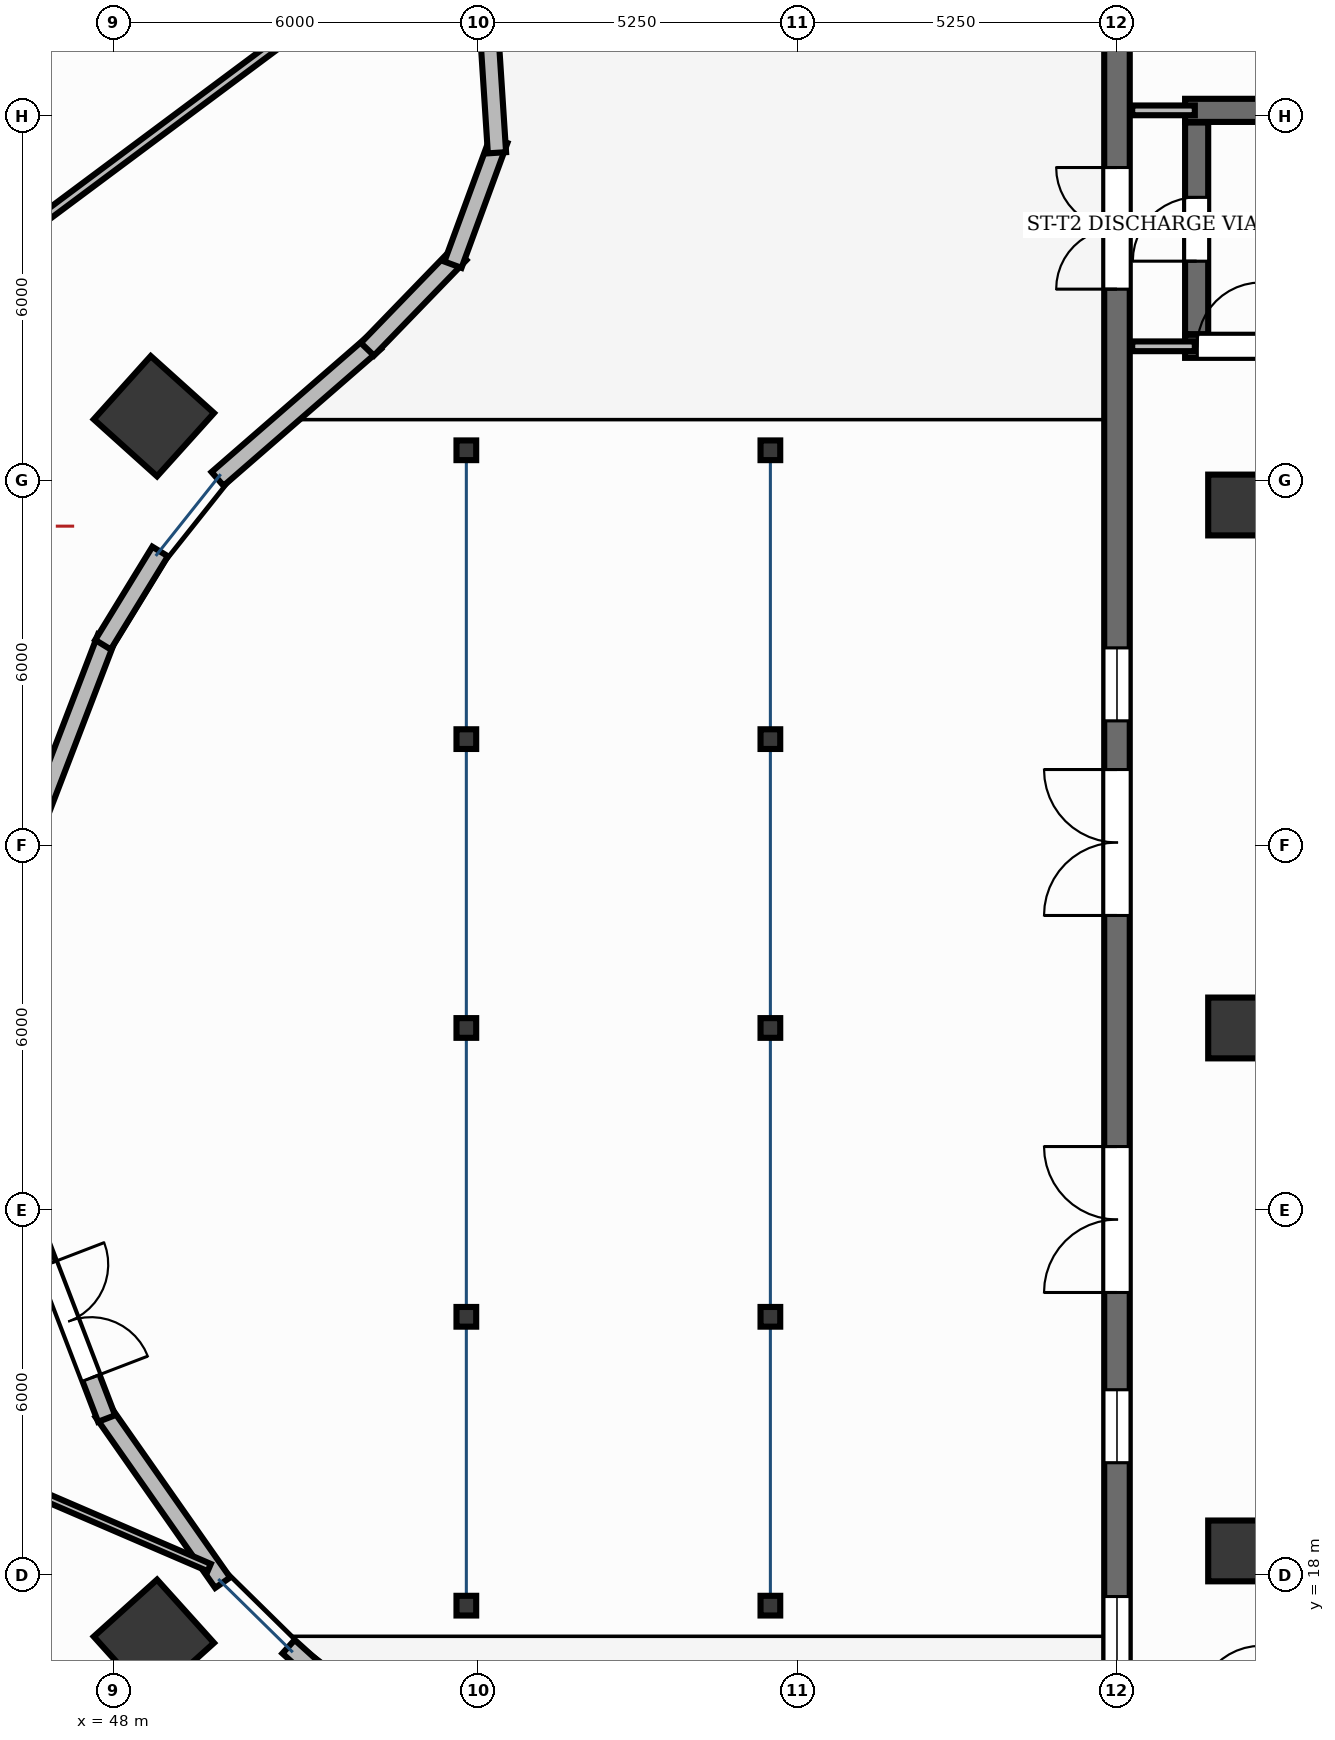
"""IFC4 building model, lengths in metres.
Left out: names, types, materials, properties, quantities, classifications, styles, units other than length and angle.
Written with IfcOpenShell. Run it as: python <this file> out.ifc"""

import sys

from ifc_helpers import new_model, si_unit, direction, frame, frame_2d, origin, origin_2d, place, context, subcontext, project, spatial, rectangle, hollow_circle, extrude, element, fill, save


model = new_model("IFC4")
c1 = context("Model", 3, precision=1e-05, world=origin(), true_north=direction((0.0, 1.0)))
c2 = subcontext(c1, "Body", "Model", "MODEL_VIEW")
j1 = project(units=[si_unit("LENGTHUNIT", "METRE"), si_unit("PLANEANGLEUNIT", "RADIAN")], contexts=[c1])
p1 = place(None, origin())
s1 = spatial("IfcSite", under=j1, at=p1, CompositionType="ELEMENT")
p2 = place(p1, origin())
s2 = spatial("IfcBuilding", under=s1, at=p2, CompositionType="ELEMENT")
p3 = place(p2, origin())
s3 = spatial("IfcBuildingStorey", under=s2, at=p3, CompositionType="ELEMENT", Elevation=0.0)
for number, where, z_axis, x_axis in (
    (1, (48.662, 16.939, -0.0), (0.0, 0.0, 1.0), (-0.669, 0.743, 0.0)),
    (2, (48.662, 37.061, -0.0), (0.0, 0.0, 1.0), (0.669, 0.743, 0.0)),
):
    element("IfcColumn", number, at=place(p3, frame(where, z_axis=z_axis, x_axis=x_axis)), inside=s3, PredefinedType="COLUMN", context=c2, shape_type="SweptSolid", body=[
        extrude(rectangle(XDim=1.4, YDim=1.4, at=origin_2d()), origin(), (0.0, 0.0, 1.0), 5.101),
    ])
for number, where, z_axis, x_axis in (
    (3, (66.5, 18.4, 0.0), (0.0, 0.0, 1.0), (1.0, 0.0, 0.0)),
    (4, (66.5, 27.0, 0.0), (0.0, 0.0, 1.0), (1.0, 0.0, 0.0)),
    (5, (66.5, 35.6, 0.0), (0.0, 0.0, 1.0), (1.0, 0.0, 0.0)),
):
    element("IfcColumn", number, at=place(p3, frame(where, z_axis=z_axis, x_axis=x_axis)), inside=s3, PredefinedType="COLUMN", context=c2, shape_type="SweptSolid", body=[
        extrude(rectangle(XDim=1.0, YDim=1.0, at=origin_2d()), origin(), (0.0, 0.0, 1.0), 5.1),
    ])
p4 = place(p3, frame((64.5, 7.25, 0.0), z_axis=(0.0, 0.0, 1.0), x_axis=(0.0, 1.0, 0.0)))
e6 = element("IfcWall", 6, at=p4, inside=s3, PredefinedType="SHEAR", context=c2, shape_type="SweptSolid", body=[
    extrude(rectangle(XDim=39.5, YDim=0.42, at=frame_2d((19.75, 0.0))), origin(), (0.0, 0.0, 1.0), 5.1),
])
p5 = place(p4, frame((9.2, 0.0, 0.9)))
e7 = element("IfcOpeningElement", 7, at=p5, cuts=e6, PredefinedType="OPENING", context=c2, shape_type="SweptSolid", body=[
    extrude(rectangle(XDim=1.2, YDim=2.7, at=frame_2d((0.6, 1.35))), frame((0.0, 0.225, 0.0), z_axis=(0.0, -1.0, 0.0), x_axis=(1.0, 0.0, 0.0)), (0.0, 0.0, 1.0), 0.45),
])
p6 = place(p4, frame((12.6, 0.0, 0.9)))
e8 = element("IfcOpeningElement", 8, at=p6, cuts=e6, PredefinedType="OPENING", context=c2, shape_type="SweptSolid", body=[
    extrude(rectangle(XDim=1.2, YDim=2.7, at=frame_2d((0.6, 1.35))), frame((0.0, 0.225, 0.0), z_axis=(0.0, -1.0, 0.0), x_axis=(1.0, 0.0, 0.0)), (0.0, 0.0, 1.0), 0.45),
])
p7 = place(p4, frame((24.8, 0.0, 0.9)))
e9 = element("IfcOpeningElement", 9, at=p7, cuts=e6, PredefinedType="OPENING", context=c2, shape_type="SweptSolid", body=[
    extrude(rectangle(XDim=1.2, YDim=2.7, at=frame_2d((0.6, 1.35))), frame((0.0, 0.225, 0.0), z_axis=(0.0, -1.0, 0.0), x_axis=(1.0, 0.0, 0.0)), (0.0, 0.0, 1.0), 0.45),
])
p8 = place(p4, frame((36.2, 0.0, 0.9)))
e10 = element("IfcOpeningElement", 10, at=p8, cuts=e6, PredefinedType="OPENING", context=c2, shape_type="SweptSolid", body=[
    extrude(rectangle(XDim=1.2, YDim=2.7, at=frame_2d((0.6, 1.35))), frame((0.0, 0.225, 0.0), z_axis=(0.0, -1.0, 0.0), x_axis=(1.0, 0.0, 0.0)), (0.0, 0.0, 1.0), 0.45),
])
p9 = place(p4, frame((15.4, 0.0, 0.0)))
e11 = element("IfcOpeningElement", 11, at=p9, cuts=e6, PredefinedType="OPENING", context=c2, shape_type="SweptSolid", body=[
    extrude(rectangle(XDim=2.4, YDim=2.7, at=frame_2d((1.2, 1.35))), frame((0.0, 0.225, 0.0), z_axis=(0.0, -1.0, 0.0), x_axis=(1.0, 0.0, 0.0)), (0.0, 0.0, 1.0), 0.45),
])
p10 = place(p4, frame((21.6, 0.0, 0.0)))
e12 = element("IfcOpeningElement", 12, at=p10, cuts=e6, PredefinedType="OPENING", context=c2, shape_type="SweptSolid", body=[
    extrude(rectangle(XDim=2.4, YDim=2.7, at=frame_2d((1.2, 1.35))), frame((0.0, 0.225, 0.0), z_axis=(0.0, -1.0, 0.0), x_axis=(1.0, 0.0, 0.0)), (0.0, 0.0, 1.0), 0.45),
])
p11 = place(p4, frame((5.6, 0.0, 0.0)))
e13 = element("IfcOpeningElement", 13, at=p11, cuts=e6, PredefinedType="OPENING", context=c2, shape_type="SweptSolid", body=[
    extrude(rectangle(XDim=2.0, YDim=2.3, at=frame_2d((1.0, 1.15))), frame((0.0, 0.225, 0.0), z_axis=(0.0, -1.0, 0.0), x_axis=(1.0, 0.0, 0.0)), (0.0, 0.0, 1.0), 0.45),
])
p12 = place(p4, frame((31.9, 0.0, 0.0)))
e14 = element("IfcOpeningElement", 14, at=p12, cuts=e6, PredefinedType="OPENING", context=c2, shape_type="SweptSolid", body=[
    extrude(rectangle(XDim=2.0, YDim=2.3, at=frame_2d((1.0, 1.15))), frame((0.0, 0.225, 0.0), z_axis=(0.0, -1.0, 0.0), x_axis=(1.0, 0.0, 0.0)), (0.0, 0.0, 1.0), 0.45),
])
p13 = place(p3, frame((65.62, 38.21, 0.0), z_axis=(0.0, 0.0, 1.0), x_axis=(1.0, 0.0, 0.0)))
e15 = element("IfcWall", 15, at=p13, inside=s3, PredefinedType="SHEAR", context=c2, shape_type="SweptSolid", body=[
    extrude(rectangle(XDim=8.61, YDim=0.38, at=frame_2d((4.305, 0.0))), origin(), (0.0, 0.0, 1.0), 5.1),
])
p14 = place(p13, frame((0.2, 0.0, 0.0)))
e16 = element("IfcOpeningElement", 16, at=p14, cuts=e15, PredefinedType="OPENING", context=c2, shape_type="SweptSolid", body=[
    extrude(rectangle(XDim=1.05, YDim=2.15, at=frame_2d((0.525, 1.075))), frame((0.0, 0.205, 0.0), z_axis=(0.0, -1.0, 0.0), x_axis=(1.0, 0.0, 0.0)), (0.0, 0.0, 1.0), 0.41),
])
p15 = place(p3, frame((65.62, 42.09, 0.0), z_axis=(0.0, 0.0, 1.0), x_axis=(1.0, 0.0, 0.0)))
e17 = element("IfcWall", 17, at=p15, inside=s3, PredefinedType="SHEAR", context=c2, shape_type="SweptSolid", body=[
    extrude(rectangle(XDim=8.61, YDim=0.38, at=frame_2d((4.305, 0.0))), origin(), (0.0, 0.0, 1.0), 5.1),
])
p16 = place(p3, frame((65.81, 38.41, 0.0), z_axis=(0.0, 0.0, 1.0), x_axis=(0.0, 1.0, 0.0)))
e18 = element("IfcWall", 18, at=p16, inside=s3, PredefinedType="SHEAR", context=c2, shape_type="SweptSolid", body=[
    extrude(rectangle(XDim=3.48, YDim=0.38, at=frame_2d((1.74, 0.0))), origin(), (0.0, 0.0, 1.0), 5.1),
])
p17 = place(p16, frame((1.2, 0.0, 0.0)))
e19 = element("IfcOpeningElement", 19, at=p17, cuts=e18, PredefinedType="OPENING", context=c2, shape_type="SweptSolid", body=[
    extrude(rectangle(XDim=1.05, YDim=2.15, at=frame_2d((0.525, 1.075))), frame((0.0, 0.205, 0.0), z_axis=(0.0, -1.0, 0.0), x_axis=(1.0, 0.0, 0.0)), (0.0, 0.0, 1.0), 0.41),
])
for number, where, z_axis, x_axis in (
    (20, (58.8, 17.5, -0.0), (0.0, 0.0, 1.0), (1.0, 0.0, 0.0)),
    (21, (53.8, 17.5, -0.0), (0.0, 0.0, 1.0), (1.0, 0.0, 0.0)),
    (22, (58.8, 22.25, -0.0), (0.0, 0.0, 1.0), (1.0, 0.0, 0.0)),
    (23, (53.8, 22.25, -0.0), (0.0, 0.0, 1.0), (1.0, 0.0, 0.0)),
    (24, (58.8, 27.0, -0.0), (0.0, 0.0, 1.0), (1.0, 0.0, 0.0)),
    (25, (53.8, 27.0, -0.0), (0.0, 0.0, 1.0), (1.0, 0.0, 0.0)),
    (26, (58.8, 31.75, -0.0), (0.0, 0.0, 1.0), (1.0, 0.0, 0.0)),
    (27, (53.8, 31.75, -0.0), (0.0, 0.0, 1.0), (1.0, 0.0, 0.0)),
    (28, (58.8, 36.5, -0.0), (0.0, 0.0, 1.0), (1.0, 0.0, 0.0)),
    (29, (53.8, 36.5, -0.0), (0.0, 0.0, 1.0), (1.0, 0.0, 0.0)),
):
    element("IfcColumn", number, at=place(p3, frame(where, z_axis=z_axis, x_axis=x_axis)), inside=s3, PredefinedType="COLUMN", context=c2, shape_type="SweptSolid", body=[
        extrude(hollow_circle(Radius=0.162, WallThickness=0.016, at=origin_2d()), origin(), (0.0, 0.0, 1.0), 5.081),
    ])
p18 = place(p3, frame((53.704, 14.264, 0.0), z_axis=(0.0, 0.0, 1.0), x_axis=(-0.74117794387, 0.671308614216, 0.0)))
e30 = element("IfcWall", 30, at=p18, inside=s3, PredefinedType="STANDARD", context=c2, shape_type="SweptSolid", body=[
    extrude(rectangle(XDim=3.816, YDim=0.3, at=frame_2d((1.908, 0.0))), origin(), (0.0, 0.0, 1.0), 5.1),
])
p19 = place(p3, frame((49.792, 17.878, 0.0), z_axis=(0.0, 0.0, 1.0), x_axis=(-0.573576992806, 0.819151654655, 0.0)))
e31 = element("IfcWall", 31, at=p19, inside=s3, PredefinedType="STANDARD", context=c2, shape_type="SweptSolid", body=[
    extrude(rectangle(XDim=3.43, YDim=0.3, at=frame_2d((1.715, 0.0))), origin(), (0.0, 0.0, 1.0), 5.1),
])
p20 = place(p3, frame((46.655, 23.779, 0.0), z_axis=(0.0, 0.0, 1.0), x_axis=(0.358344570513, -0.933589400531, 0.0)))
e32 = element("IfcWall", 32, at=p20, inside=s3, PredefinedType="STANDARD", context=c2, shape_type="SweptSolid", body=[
    extrude(rectangle(XDim=3.43, YDim=0.3, at=frame_2d((1.715, 0.0))), origin(), (0.0, 0.0, 1.0), 5.1),
])
p21 = place(p20, frame((0.715, 0.0, 0.0)))
e33 = element("IfcOpeningElement", 33, at=p21, cuts=e32, PredefinedType="OPENING", context=c2, shape_type="SweptSolid", body=[
    extrude(rectangle(XDim=2.0, YDim=2.3, at=frame_2d((1.0, 1.15))), frame((0.0, 0.165, 0.0), z_axis=(0.0, -1.0, 0.0), x_axis=(1.0, 0.0, 0.0)), (0.0, 0.0, 1.0), 0.33),
])
p22 = place(p3, frame((46.655, 30.221, 0.0), z_axis=(0.0, 0.0, 1.0), x_axis=(0.358344570513, 0.933589400531, 0.0)))
e34 = element("IfcWall", 34, at=p22, inside=s3, PredefinedType="STANDARD", context=c2, shape_type="SweptSolid", body=[
    extrude(rectangle(XDim=3.43, YDim=0.3, at=frame_2d((1.715, 0.0))), origin(), (0.0, 0.0, 1.0), 5.1),
])
p23 = place(p3, frame((47.825, 33.303, 0.0), z_axis=(0.0, 0.0, 1.0), x_axis=(0.522520662875, 0.852626622191, 0.0)))
e35 = element("IfcWall", 35, at=p23, inside=s3, PredefinedType="STANDARD", context=c2, shape_type="SweptSolid", body=[
    extrude(rectangle(XDim=1.798, YDim=0.3, at=frame_2d((0.899, 0.0))), origin(), (0.0, 0.0, 1.0), 5.1),
])
p24 = place(p3, frame((49.709, 36.029, 0.0), z_axis=(0.0, 0.0, 1.0), x_axis=(0.754746490246, 0.656016566454, 0.0)))
e36 = element("IfcWall", 36, at=p24, inside=s3, PredefinedType="STANDARD", context=c2, shape_type="SweptSolid", body=[
    extrude(rectangle(XDim=3.43, YDim=0.3, at=frame_2d((1.715, 0.0))), origin(), (0.0, 0.0, 1.0), 5.1),
])
p25 = place(p3, frame((52.173, 38.161, 0.0), z_axis=(0.0, 0.0, 1.0), x_axis=(0.695404695719, 0.718618333451, 0.0)))
e37 = element("IfcWall", 37, at=p25, inside=s3, PredefinedType="STANDARD", context=c2, shape_type="SweptSolid", body=[
    extrude(rectangle(XDim=2.188, YDim=0.3, at=frame_2d((1.094, 0.0))), origin(), (0.0, 0.0, 1.0), 5.1),
])
for number, where, z_axis, x_axis in (
    (38, (53.58, 39.552, 0.0), (0.0, 0.0, 1.0), (0.345, 0.939, 0.0)),
    (39, (54.304, 41.393, 0.0), (0.0, 0.0, 1.0), (-0.065, 0.998, 0.0)),
):
    element("IfcWall", number, at=place(p3, frame(where, z_axis=z_axis, x_axis=x_axis)), inside=s3, PredefinedType="STANDARD", context=c2, shape_type="SweptSolid", body=[
        extrude(rectangle(XDim=2.188, YDim=0.3, at=frame_2d((1.094, 0.0))), origin(), (0.0, 0.0, 1.0), 5.1),
    ])
for number, where, z_axis, x_axis in (
    (40, (64.75, 38.21, 0.0), (0.0, 0.0, 1.0), (1.0, 0.0, 0.0)),
    (41, (64.75, 42.09, 0.0), (0.0, 0.0, 1.0), (1.0, 0.0, 0.0)),
):
    element("IfcWall", number, at=place(p3, frame(where, z_axis=z_axis, x_axis=x_axis)), inside=s3, PredefinedType="PARTITIONING", context=c2, shape_type="SweptSolid", body=[
        extrude(rectangle(XDim=1.03, YDim=0.16, at=frame_2d((0.515, 0.0))), origin(), (0.0, 0.0, 1.0), 4.11),
    ])
p26 = place(p3, frame((45.71, 19.79, 0.0), z_axis=(0.0, 0.0, 1.0), x_axis=(0.918452858102, -0.395530463358, 0.0)))
e42 = element("IfcWall", 42, at=p26, inside=s3, PredefinedType="PARTITIONING", context=c2, shape_type="SweptSolid", body=[
    extrude(rectangle(XDim=4.205, YDim=0.13, at=frame_2d((2.102, 0.0))), origin(), (0.0, 0.0, 1.0), 4.11),
])
p27 = place(p3, frame((43.21, 37.609, 0.0), z_axis=(0.0, 0.0, 1.0), x_axis=(0.801772318533, 0.597629608733, 0.0)))
e43 = element("IfcWall", 43, at=p27, inside=s3, PredefinedType="PARTITIONING", context=c2, shape_type="SweptSolid", body=[
    extrude(rectangle(XDim=12.703, YDim=0.15, at=frame_2d((6.352, 0.0))), origin(), (0.0, 0.0, 1.0), 4.11),
])
p28 = place(p21, origin())
e44 = element("IfcDoor", 44, at=p28, inside=s3, OperationType="DOUBLE_DOOR_SINGLE_SWING", PredefinedType="DOOR", context=c2, shape_type="SweptSolid", body=[
    extrude(rectangle(XDim=2.0, YDim=2.3, at=frame_2d((1.0, 1.15))), frame((0.0, 0.025, 0.0), z_axis=(0.0, -1.0, 0.0), x_axis=(1.0, 0.0, 0.0)), (0.0, 0.0, 1.0), 0.05),
])
fill(e33, e44)
p29 = place(p5, origin())
e45 = element("IfcWindow", 45, at=p29, inside=s3, PartitioningType="SINGLE_PANEL", PredefinedType="WINDOW", context=c2, shape_type="SweptSolid", body=[
    extrude(rectangle(XDim=1.2, YDim=2.7, at=frame_2d((0.6, 1.35))), frame((0.0, 0.03, 0.0), z_axis=(0.0, -1.0, 0.0), x_axis=(1.0, 0.0, 0.0)), (0.0, 0.0, 1.0), 0.06),
])
fill(e7, e45)
p30 = place(p6, origin())
e46 = element("IfcWindow", 46, at=p30, inside=s3, PartitioningType="SINGLE_PANEL", PredefinedType="WINDOW", context=c2, shape_type="SweptSolid", body=[
    extrude(rectangle(XDim=1.2, YDim=2.7, at=frame_2d((0.6, 1.35))), frame((0.0, 0.03, 0.0), z_axis=(0.0, -1.0, 0.0), x_axis=(1.0, 0.0, 0.0)), (0.0, 0.0, 1.0), 0.06),
])
fill(e8, e46)
p31 = place(p7, origin())
e47 = element("IfcWindow", 47, at=p31, inside=s3, PartitioningType="SINGLE_PANEL", PredefinedType="WINDOW", context=c2, shape_type="SweptSolid", body=[
    extrude(rectangle(XDim=1.2, YDim=2.7, at=frame_2d((0.6, 1.35))), frame((0.0, 0.03, 0.0), z_axis=(0.0, -1.0, 0.0), x_axis=(1.0, 0.0, 0.0)), (0.0, 0.0, 1.0), 0.06),
])
fill(e9, e47)
p32 = place(p9, origin())
e48 = element("IfcDoor", 48, at=p32, inside=s3, OperationType="DOUBLE_DOOR_SINGLE_SWING", PredefinedType="DOOR", context=c2, shape_type="SweptSolid", body=[
    extrude(rectangle(XDim=2.4, YDim=2.7, at=frame_2d((1.2, 1.35))), frame((0.0, 0.025, 0.0), z_axis=(0.0, -1.0, 0.0), x_axis=(1.0, 0.0, 0.0)), (0.0, 0.0, 1.0), 0.05),
])
fill(e11, e48)
p33 = place(p10, origin())
e49 = element("IfcDoor", 49, at=p33, inside=s3, OperationType="DOUBLE_DOOR_SINGLE_SWING", PredefinedType="DOOR", context=c2, shape_type="SweptSolid", body=[
    extrude(rectangle(XDim=2.4, YDim=2.7, at=frame_2d((1.2, 1.35))), frame((0.0, 0.025, 0.0), z_axis=(0.0, -1.0, 0.0), x_axis=(1.0, 0.0, 0.0)), (0.0, 0.0, 1.0), 0.05),
])
fill(e12, e49)
p34 = place(p12, origin())
e50 = element("IfcDoor", 50, at=p34, inside=s3, OperationType="DOUBLE_DOOR_SINGLE_SWING", PredefinedType="DOOR", context=c2, shape_type="SweptSolid", body=[
    extrude(rectangle(XDim=2.0, YDim=2.3, at=frame_2d((1.0, 1.15))), frame((0.0, 0.025, 0.0), z_axis=(0.0, -1.0, 0.0), x_axis=(1.0, 0.0, 0.0)), (0.0, 0.0, 1.0), 0.05),
])
fill(e14, e50)
p35 = place(p14, origin())
e51 = element("IfcDoor", 51, at=p35, inside=s3, OperationType="SINGLE_SWING_RIGHT", PredefinedType="DOOR", context=c2, shape_type="SweptSolid", body=[
    extrude(rectangle(XDim=1.05, YDim=2.15, at=frame_2d((0.525, 1.075))), frame((0.0, 0.025, 0.0), z_axis=(0.0, -1.0, 0.0), x_axis=(1.0, 0.0, 0.0)), (0.0, 0.0, 1.0), 0.05),
])
fill(e16, e51)
p36 = place(p17, origin())
e52 = element("IfcDoor", 52, at=p36, inside=s3, OperationType="SINGLE_SWING_LEFT", PredefinedType="DOOR", context=c2, shape_type="SweptSolid", body=[
    extrude(rectangle(XDim=1.05, YDim=2.15, at=frame_2d((0.525, 1.075))), frame((0.0, 0.025, 0.0), z_axis=(0.0, -1.0, 0.0), x_axis=(1.0, 0.0, 0.0)), (0.0, 0.0, 1.0), 0.05),
])
fill(e19, e52)
save(model, sys.argv[1])
